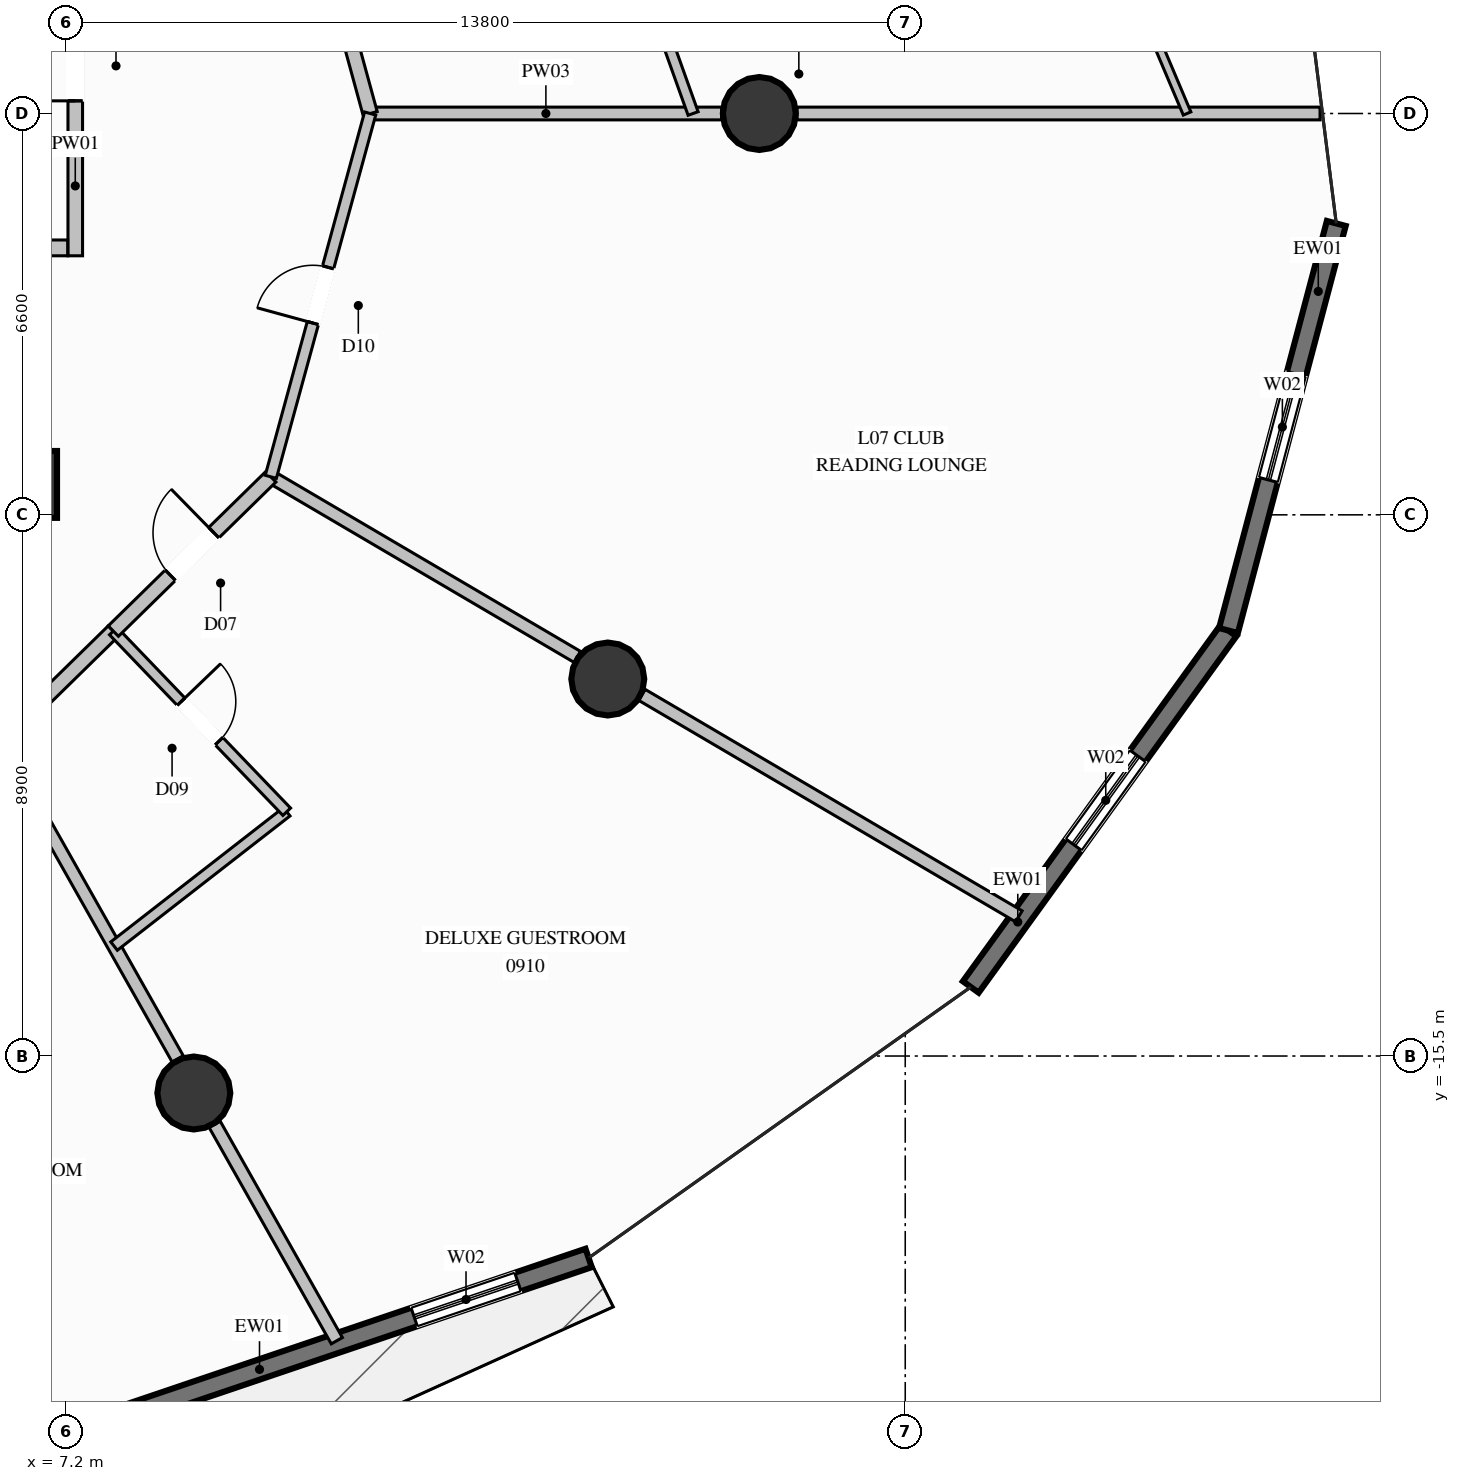
"""IFC4 building model, lengths in metres.
Left out: names, types, materials, properties, quantities, classifications, styles, units other than length and angle.
Written with IfcOpenShell. Run it as: python <this file> out.ifc"""

import sys

from ifc_helpers import new_model, si_unit, direction, frame, frame_2d, origin, origin_2d, place, context, subcontext, project, spatial, rectangle, circle, extrude, element, fill, save


model = new_model("IFC4")
c1 = context("Model", 3, precision=1e-05, world=origin(), true_north=direction((0.0, 1.0)))
c2 = subcontext(c1, "Body", "Model", "MODEL_VIEW")
j1 = project(units=[si_unit("LENGTHUNIT", "METRE"), si_unit("PLANEANGLEUNIT", "RADIAN")], contexts=[c1])
p1 = place(None, origin())
s1 = spatial("IfcSite", under=j1, at=p1, CompositionType="ELEMENT")
p2 = place(p1, origin())
s2 = spatial("IfcBuilding", under=s1, at=p2, CompositionType="ELEMENT")
p3 = place(p2, frame((0.0, 0.0, 35.6)))
s3 = spatial("IfcBuildingStorey", under=s2, at=p3, CompositionType="ELEMENT", Elevation=35.6)
p4 = place(p3, frame((6.5, -6.1, 0.0), z_axis=(0.0, 0.0, 1.0), x_axis=(1.0, 0.0, 0.0)))
e1 = element("IfcColumn", 1, at=p4, inside=s3, PredefinedType="COLUMN", context=c2, shape_type="SweptSolid", body=[
    extrude(rectangle(XDim=1.1, YDim=1.1, at=origin_2d()), origin(), (0.0, 0.0, 1.0), 3.6),
])
for number, where, z_axis, x_axis in (
    (2, (18.6, 0.0, 0.0), (0.0, 0.0, 1.0), (1.0, 0.0, 0.0)),
    (3, (9.3, -16.108, 0.0), (0.0, 0.0, 1.0), (1.0, 0.0, 0.0)),
    (4, (16.108, -9.3, 0.0), (0.0, 0.0, 1.0), (1.0, 0.0, 0.0)),
):
    element("IfcColumn", number, at=place(p3, frame(where, z_axis=z_axis, x_axis=x_axis)), inside=s3, PredefinedType="COLUMN", context=c2, shape_type="SweptSolid", body=[
        extrude(circle(Radius=0.6, at=origin_2d()), origin(), (0.0, 0.0, 1.0), 3.6),
    ])
p5 = place(p3, frame((15.793, -18.821, 0.0), z_axis=(0.0, 0.0, 1.0), x_axis=(-0.94717495877, -0.320717317085, 0.0)))
e5 = element("IfcWall", 5, at=p5, inside=s3, PredefinedType="SOLIDWALL", context=c2, shape_type="SweptSolid", body=[
    extrude(rectangle(XDim=8.151, YDim=0.32, at=frame_2d((4.075, 0.0))), origin(), (0.0, 0.0, 1.0), 3.34),
])
p6 = place(p5, frame((1.229, 0.0, 0.35)))
e6 = element("IfcOpeningElement", 6, at=p6, cuts=e5, PredefinedType="OPENING", context=c2, shape_type="SweptSolid", body=[
    extrude(rectangle(XDim=1.8, YDim=2.6, at=frame_2d((0.9, 1.3))), frame((0.0, 0.17, 0.0), z_axis=(0.0, -1.0, 0.0), x_axis=(1.0, 0.0, 0.0)), (0.0, 0.0, 1.0), 0.34),
])
p7 = place(p3, frame((26.316, -8.503, 0.0), z_axis=(0.0, 0.0, 1.0), x_axis=(-0.585883584877, -0.810395227634, 0.0)))
e7 = element("IfcWall", 7, at=p7, inside=s3, PredefinedType="SOLIDWALL", context=c2, shape_type="SweptSolid", body=[
    extrude(rectangle(XDim=7.234, YDim=0.32, at=frame_2d((3.617, 0.0))), origin(), (0.0, 0.0, 1.0), 3.34),
])
p8 = place(p7, frame((2.545, 0.0, 0.35)))
e8 = element("IfcOpeningElement", 8, at=p8, cuts=e7, PredefinedType="OPENING", context=c2, shape_type="SweptSolid", body=[
    extrude(rectangle(XDim=1.8, YDim=2.6, at=frame_2d((0.9, 1.3))), frame((0.0, 0.17, 0.0), z_axis=(0.0, -1.0, 0.0), x_axis=(1.0, 0.0, 0.0)), (0.0, 0.0, 1.0), 0.34),
])
p9 = place(p3, frame((28.089, -1.808, 0.0), z_axis=(0.0, 0.0, 1.0), x_axis=(-0.256032082016, -0.966668284873, 0.0)))
e9 = element("IfcWall", 9, at=p9, inside=s3, PredefinedType="SOLIDWALL", context=c2, shape_type="SweptSolid", body=[
    extrude(rectangle(XDim=6.926, YDim=0.32, at=frame_2d((3.463, 0.0))), origin(), (0.0, 0.0, 1.0), 3.34),
])
p10 = place(p9, frame((2.563, 0.0, 0.35)))
e10 = element("IfcOpeningElement", 10, at=p10, cuts=e9, PredefinedType="OPENING", context=c2, shape_type="SweptSolid", body=[
    extrude(rectangle(XDim=1.8, YDim=2.6, at=frame_2d((0.9, 1.3))), frame((0.0, 0.17, 0.0), z_axis=(0.0, -1.0, 0.0), x_axis=(1.0, 0.0, 0.0)), (0.0, 0.0, 1.0), 0.34),
])
p11 = place(p3, frame((7.35, -2.34, 0.0), z_axis=(0.0, 0.0, 1.0), x_axis=(0.0, 1.0, 0.0)))
e11 = element("IfcWall", 11, at=p11, inside=s3, PredefinedType="PARTITIONING", context=c2, shape_type="SweptSolid", body=[
    extrude(rectangle(XDim=5.07, YDim=0.24, at=frame_2d((2.535, 0.0))), origin(), (0.0, 0.0, 1.0), 2.425),
])
p12 = place(p11, frame((2.548, 0.0, 0.0)))
e12 = element("IfcOpeningElement", 12, at=p12, cuts=e11, PredefinedType="OPENING", context=c2, shape_type="SweptSolid", body=[
    extrude(rectangle(XDim=1.15, YDim=2.2, at=frame_2d((0.575, 1.1))), frame((0.0, 0.13, 0.0), z_axis=(0.0, -1.0, 0.0), x_axis=(1.0, 0.0, 0.0)), (0.0, 0.0, 1.0), 0.26),
])
p13 = place(p3, frame((6.35, -2.21, 0.0), z_axis=(0.0, 0.0, 1.0), x_axis=(1.0, 0.0, 0.0)))
e13 = element("IfcWall", 13, at=p13, inside=s3, PredefinedType="PARTITIONING", context=c2, shape_type="SweptSolid", body=[
    extrude(rectangle(XDim=0.875, YDim=0.26, at=frame_2d((0.438, 0.0))), origin(), (0.0, 0.0, 1.0), 3.34),
])
p14 = place(p3, frame((12.2, 0.0, 0.0), z_axis=(0.0, 0.0, 1.0), x_axis=(1.0, 0.0, 0.0)))
e14 = element("IfcWall", 14, at=p14, inside=s3, PredefinedType="PARTITIONING", context=c2, shape_type="SweptSolid", body=[
    extrude(rectangle(XDim=5.78, YDim=0.21, at=frame_2d((2.89, 0.0))), origin(), (0.0, 0.0, 1.0), 2.707),
])
p15 = place(p3, frame((19.22, 0.0, 0.0), z_axis=(0.0, 0.0, 1.0), x_axis=(1.0, 0.0, 0.0)))
e15 = element("IfcWall", 15, at=p15, inside=s3, PredefinedType="PARTITIONING", context=c2, shape_type="SweptSolid", body=[
    extrude(rectangle(XDim=8.602, YDim=0.21, at=frame_2d((4.301, 0.0))), origin(), (0.0, 0.0, 1.0), 3.34),
])
p16 = place(p3, frame((6.1, -10.349, 0.0), z_axis=(0.0, 0.0, 1.0), x_axis=(0.491652896219, -0.870791266401, 0.0)))
e16 = element("IfcWall", 16, at=p16, inside=s3, PredefinedType="PARTITIONING", context=c2, shape_type="SweptSolid", body=[
    extrude(rectangle(XDim=5.969, YDim=0.21, at=frame_2d((2.985, 0.0))), origin(), (0.0, 0.0, 1.0), 2.707),
])
p17 = place(p3, frame((9.643, -16.624, 0.0), z_axis=(0.0, 0.0, 1.0), x_axis=(0.491698874435, -0.87076530528, 0.0)))
e17 = element("IfcWall", 17, at=p17, inside=s3, PredefinedType="PARTITIONING", context=c2, shape_type="SweptSolid", body=[
    extrude(rectangle(XDim=4.086, YDim=0.21, at=frame_2d((2.043, 0.0))), origin(), (0.0, 0.0, 1.0), 3.34),
])
p18 = place(p3, frame((10.566, -5.975, 0.0), z_axis=(0.0, 0.0, 1.0), x_axis=(0.862217531027, -0.506538181374, 0.0)))
e18 = element("IfcWall", 18, at=p18, inside=s3, PredefinedType="PARTITIONING", context=c2, shape_type="SweptSolid", body=[
    extrude(rectangle(XDim=5.845, YDim=0.21, at=frame_2d((2.923, 0.0))), origin(), (0.0, 0.0, 1.0), 2.707),
])
p19 = place(p3, frame((16.67, -9.561, 0.0), z_axis=(0.0, 0.0, 1.0), x_axis=(0.862214298177, -0.506543684215, 0.0)))
e19 = element("IfcWall", 19, at=p19, inside=s3, PredefinedType="PARTITIONING", context=c2, shape_type="SweptSolid", body=[
    extrude(rectangle(XDim=7.19, YDim=0.21, at=frame_2d((3.595, 0.0))), origin(), (0.0, 0.0, 1.0), 3.34),
])
p20 = place(p3, frame((12.2, 0.0, 0.0), z_axis=(0.0, 0.0, 1.0), x_axis=(-0.263744763784, 0.964592504416, 0.0)))
e20 = element("IfcWall", 20, at=p20, inside=s3, PredefinedType="PARTITIONING", context=c2, shape_type="SweptSolid", body=[
    extrude(rectangle(XDim=2.601, YDim=0.24, at=frame_2d((1.301, 0.0))), origin(), (0.0, 0.0, 1.0), 2.917),
])
p21 = place(p3, frame((17.511, 0.0, 0.0), z_axis=(0.0, 0.0, 1.0), x_axis=(-0.336724431673, 0.94160323763, 0.0)))
e21 = element("IfcWall", 21, at=p21, inside=s3, PredefinedType="PLUMBINGWALL", context=c2, shape_type="SweptSolid", body=[
    extrude(rectangle(XDim=3.707, YDim=0.175, at=frame_2d((1.853, 0.0))), origin(), (0.0, 0.0, 1.0), 3.34),
])
p22 = place(p3, frame((25.635, 0.0, 0.0), z_axis=(0.0, 0.0, 1.0), x_axis=(-0.389280036571, 0.921119456491, 0.0)))
e22 = element("IfcWall", 22, at=p22, inside=s3, PredefinedType="PARTITIONING", context=c2, shape_type="SweptSolid", body=[
    extrude(rectangle(XDim=12.901, YDim=0.135, at=frame_2d((6.45, 0.0))), origin(), (0.0, 0.0, 1.0), 3.34),
])
p23 = place(p22, frame((5.975, 0.0, 0.0)))
e23 = element("IfcOpeningElement", 23, at=p23, cuts=e22, PredefinedType="OPENING", context=c2, shape_type="SweptSolid", body=[
    extrude(rectangle(XDim=0.95, YDim=2.1, at=frame_2d((0.475, 1.05))), frame((0.0, 0.078, 0.0), z_axis=(0.0, -1.0, 0.0), x_axis=(1.0, 0.0, 0.0)), (0.0, 0.0, 1.0), 0.155),
])
p24 = place(p3, frame((6.1, -10.349, 0.0), z_axis=(0.0, 0.0, 1.0), x_axis=(0.714460071513, 0.69967621527, 0.0)))
e24 = element("IfcWall", 24, at=p24, inside=s3, PredefinedType="PARTITIONING", context=c2, shape_type="SweptSolid", body=[
    extrude(rectangle(XDim=2.626, YDim=0.24, at=frame_2d((1.313, 0.0))), origin(), (0.0, 0.0, 1.0), 3.34),
])
p25 = place(p3, frame((7.988, -13.692, 0.0), z_axis=(0.0, 0.0, 1.0), x_axis=(0.78932298539, 0.613978195651, 0.0)))
e25 = element("IfcWall", 25, at=p25, inside=s3, PredefinedType="PLUMBINGWALL", context=c2, shape_type="SweptSolid", body=[
    extrude(rectangle(XDim=3.598, YDim=0.175, at=frame_2d((1.799, 0.0))), origin(), (0.0, 0.0, 1.0), 3.34),
])
p26 = place(p3, frame((7.976, -8.512, 0.0), z_axis=(0.0, 0.0, 1.0), x_axis=(0.692493571669, -0.721424045342, 0.0)))
e26 = element("IfcWall", 26, at=p26, inside=s3, PredefinedType="PLUMBINGWALL", context=c2, shape_type="SweptSolid", body=[
    extrude(rectangle(XDim=4.118, YDim=0.175, at=frame_2d((2.059, 0.0))), origin(), (0.0, 0.0, 1.0), 3.34),
])
p27 = place(p26, frame((1.609, 0.0, 0.0)))
e27 = element("IfcOpeningElement", 27, at=p27, cuts=e26, PredefinedType="OPENING", context=c2, shape_type="SweptSolid", body=[
    extrude(rectangle(XDim=0.9, YDim=2.1, at=frame_2d((0.45, 1.05))), frame((0.0, 0.098, 0.0), z_axis=(0.0, -1.0, 0.0), x_axis=(1.0, 0.0, 0.0)), (0.0, 0.0, 1.0), 0.195),
])
p28 = place(p3, frame((7.976, -8.512, 0.0), z_axis=(0.0, 0.0, 1.0), x_axis=(0.714375756875, 0.699762301064, 0.0)))
e28 = element("IfcWall", 28, at=p28, inside=s3, PredefinedType="PARTITIONING", context=c2, shape_type="SweptSolid", body=[
    extrude(rectangle(XDim=3.625, YDim=0.24, at=frame_2d((1.812, 0.0))), origin(), (0.0, 0.0, 1.0), 3.34),
])
p29 = place(p28, frame((1.313, 0.0, 0.0)))
e29 = element("IfcOpeningElement", 29, at=p29, cuts=e28, PredefinedType="OPENING", context=c2, shape_type="SweptSolid", body=[
    extrude(rectangle(XDim=1.0, YDim=2.2, at=frame_2d((0.5, 1.1))), frame((0.0, 0.13, 0.0), z_axis=(0.0, -1.0, 0.0), x_axis=(1.0, 0.0, 0.0)), (0.0, 0.0, 1.0), 0.26),
])
p30 = place(p3, frame((10.566, -5.975, 0.0), z_axis=(0.0, 0.0, 1.0), x_axis=(0.263787657435, 0.964580775148, 0.0)))
e30 = element("IfcWall", 30, at=p30, inside=s3, PredefinedType="PARTITIONING", context=c2, shape_type="SweptSolid", body=[
    extrude(rectangle(XDim=6.195, YDim=0.19, at=frame_2d((3.097, 0.0))), origin(), (0.0, 0.0, 1.0), 2.917),
])
p31 = place(p30, frame((2.622, 0.0, 0.0)))
e31 = element("IfcOpeningElement", 31, at=p31, cuts=e30, PredefinedType="OPENING", context=c2, shape_type="SweptSolid", body=[
    extrude(rectangle(XDim=0.95, YDim=2.1, at=frame_2d((0.475, 1.05))), frame((0.0, 0.105, 0.0), z_axis=(0.0, -1.0, 0.0), x_axis=(1.0, 0.0, 0.0)), (0.0, 0.0, 1.0), 0.21),
])
p32 = place(p6, origin())
e32 = element("IfcWindow", 32, at=p32, inside=s3, PartitioningType="SINGLE_PANEL", PredefinedType="WINDOW", context=c2, shape_type="SweptSolid", body=[
    extrude(rectangle(XDim=1.8, YDim=2.6, at=frame_2d((0.9, 1.3))), frame((0.0, 0.03, 0.0), z_axis=(0.0, -1.0, 0.0), x_axis=(1.0, 0.0, 0.0)), (0.0, 0.0, 1.0), 0.06),
])
fill(e6, e32)
p33 = place(p8, origin())
e33 = element("IfcWindow", 33, at=p33, inside=s3, PartitioningType="SINGLE_PANEL", PredefinedType="WINDOW", context=c2, shape_type="SweptSolid", body=[
    extrude(rectangle(XDim=1.8, YDim=2.6, at=frame_2d((0.9, 1.3))), frame((0.0, 0.03, 0.0), z_axis=(0.0, -1.0, 0.0), x_axis=(1.0, 0.0, 0.0)), (0.0, 0.0, 1.0), 0.06),
])
fill(e8, e33)
p34 = place(p10, origin())
e34 = element("IfcWindow", 34, at=p34, inside=s3, PartitioningType="SINGLE_PANEL", PredefinedType="WINDOW", context=c2, shape_type="SweptSolid", body=[
    extrude(rectangle(XDim=1.8, YDim=2.6, at=frame_2d((0.9, 1.3))), frame((0.0, 0.03, 0.0), z_axis=(0.0, -1.0, 0.0), x_axis=(1.0, 0.0, 0.0)), (0.0, 0.0, 1.0), 0.06),
])
fill(e10, e34)
p35 = place(p12, origin())
e35 = element("IfcDoor", 35, at=p35, inside=s3, OperationType="SINGLE_SWING_LEFT", PredefinedType="DOOR", context=c2, shape_type="SweptSolid", body=[
    extrude(rectangle(XDim=1.15, YDim=2.2, at=frame_2d((0.575, 1.1))), frame((0.0, 0.025, 0.0), z_axis=(0.0, -1.0, 0.0), x_axis=(1.0, 0.0, 0.0)), (0.0, 0.0, 1.0), 0.05),
])
fill(e12, e35)
p36 = place(p27, origin())
e36 = element("IfcDoor", 36, at=p36, inside=s3, OperationType="SINGLE_SWING_LEFT", PredefinedType="DOOR", context=c2, shape_type="SweptSolid", body=[
    extrude(rectangle(XDim=0.9, YDim=2.1, at=frame_2d((0.45, 1.05))), frame((0.0, 0.025, 0.0), z_axis=(0.0, -1.0, 0.0), x_axis=(1.0, 0.0, 0.0)), (0.0, 0.0, 1.0), 0.05),
])
fill(e27, e36)
p37 = place(p29, origin())
e37 = element("IfcDoor", 37, at=p37, inside=s3, OperationType="SINGLE_SWING_RIGHT", PredefinedType="DOOR", context=c2, shape_type="SweptSolid", body=[
    extrude(rectangle(XDim=1.0, YDim=2.2, at=frame_2d((0.5, 1.1))), frame((0.0, 0.025, 0.0), z_axis=(0.0, -1.0, 0.0), x_axis=(1.0, 0.0, 0.0)), (0.0, 0.0, 1.0), 0.05),
])
fill(e29, e37)
p38 = place(p31, origin())
e38 = element("IfcDoor", 38, at=p38, inside=s3, OperationType="SINGLE_SWING_LEFT", PredefinedType="DOOR", context=c2, shape_type="SweptSolid", body=[
    extrude(rectangle(XDim=0.95, YDim=2.1, at=frame_2d((0.475, 1.05))), frame((0.0, 0.025, 0.0), z_axis=(0.0, -1.0, 0.0), x_axis=(1.0, 0.0, 0.0)), (0.0, 0.0, 1.0), 0.05),
])
fill(e31, e38)
save(model, sys.argv[1])
